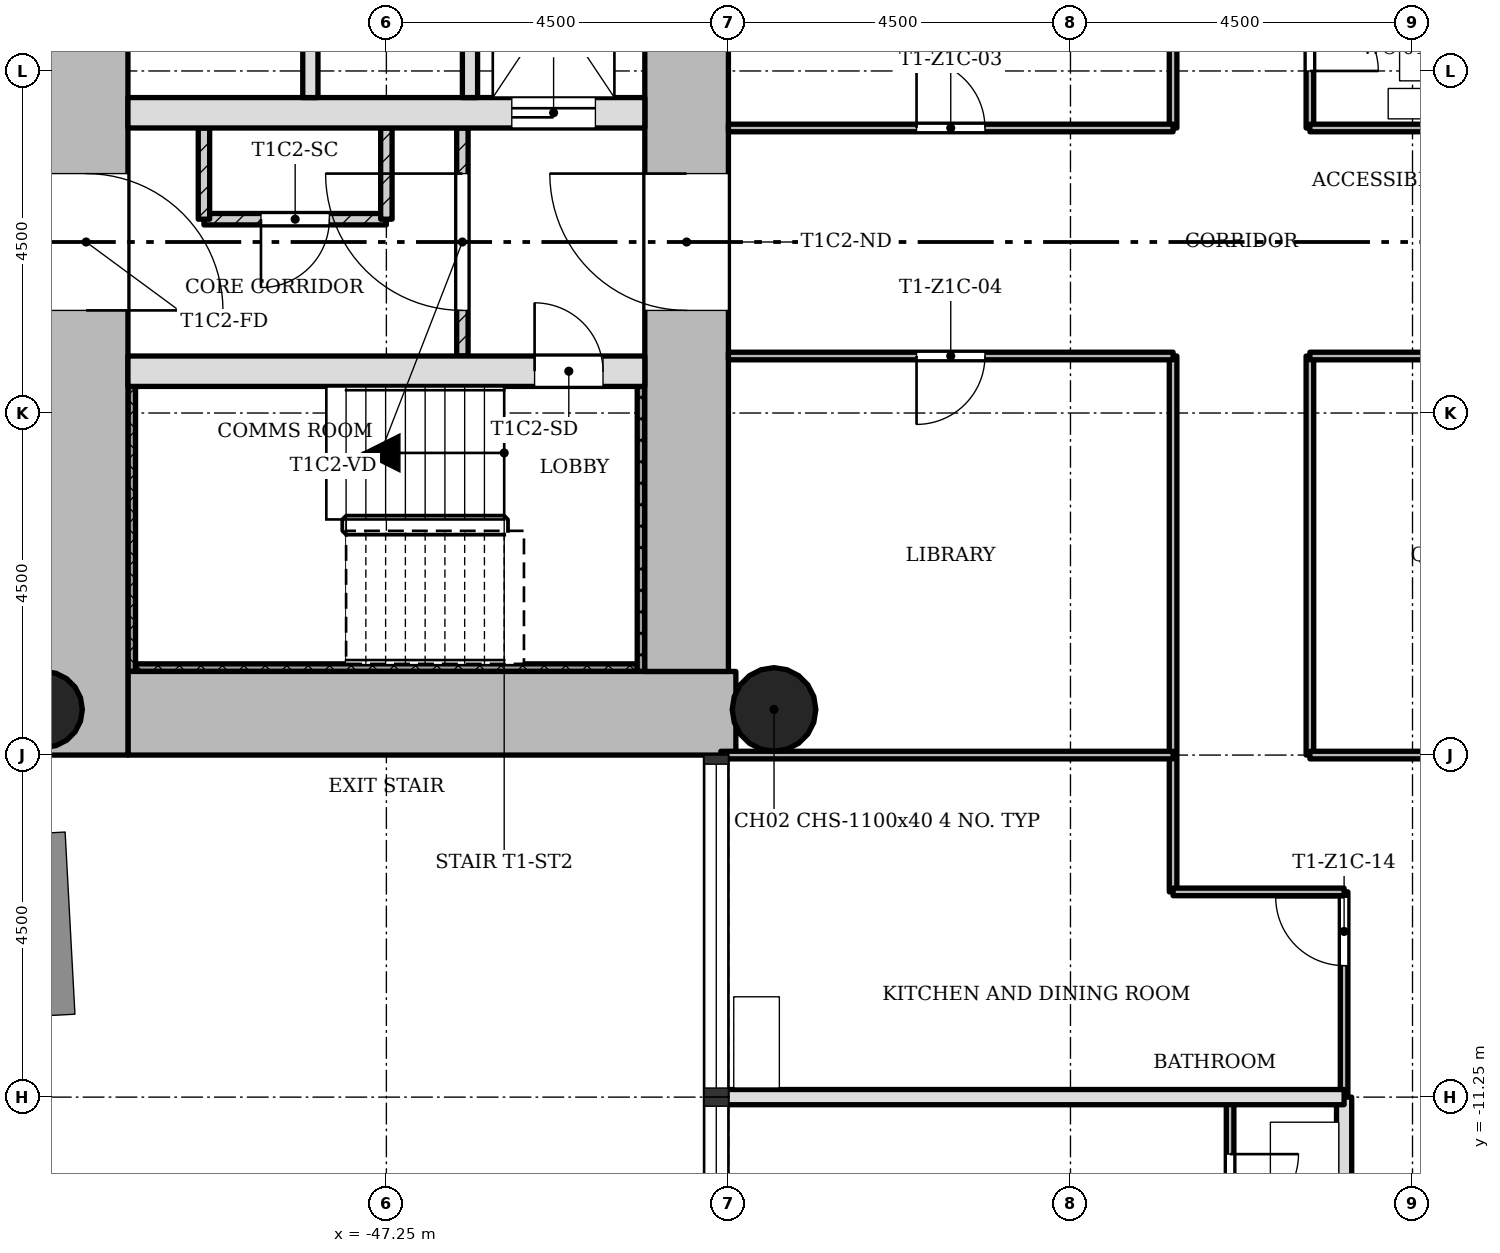
"""IFC4 building model, lengths in metres.
Left out: names, types, materials, properties, quantities, classifications, styles, units other than length and angle.
Written with IfcOpenShell. Run it as: python <this file> out.ifc"""

import sys

from ifc_helpers import new_model, si_unit, direction, frame, frame_2d, origin, origin_2d, place, context, subcontext, project, spatial, rectangle, hollow_circle, extrude, element, fill, save


model = new_model("IFC4")
c1 = context("Model", 3, precision=1e-05, world=origin(), true_north=direction((0.0, 1.0)))
c2 = subcontext(c1, "Body", "Model", "MODEL_VIEW")
j1 = project(units=[si_unit("LENGTHUNIT", "METRE"), si_unit("PLANEANGLEUNIT", "RADIAN")], contexts=[c1])
p1 = place(None, origin())
s1 = spatial("IfcSite", under=j1, at=p1, CompositionType="ELEMENT")
p2 = place(p1, origin())
s2 = spatial("IfcBuilding", under=s1, at=p2, CompositionType="ELEMENT")
p3 = place(p2, frame((0.0, 0.0, 44.9)))
s3 = spatial("IfcBuildingStorey", under=s2, at=p3, CompositionType="ELEMENT", Elevation=44.9)
p4 = place(p3, frame((-50.65, -6.2, 0.0), z_axis=(0.0, 0.0, 1.0), x_axis=(1.0, 0.0, 0.0)))
e1 = element("IfcWall", 1, at=p4, inside=s3, PredefinedType="SHEAR", context=c2, shape_type="SweptSolid", body=[
    extrude(rectangle(XDim=7.998, YDim=1.1, at=frame_2d((3.999, 0.0))), origin(), (0.0, 0.0, 1.0), 3.4),
])
p5 = place(p3, frame((-43.3, -5.65, 0.0), z_axis=(0.0, 0.0, 1.0), x_axis=(0.0, 1.0, 0.0)))
e2 = element("IfcWall", 2, at=p5, inside=s3, PredefinedType="SHEAR", context=c2, shape_type="SweptSolid", body=[
    extrude(rectangle(XDim=12.4, YDim=1.1, at=frame_2d((6.2, 0.0))), origin(), (0.0, 0.0, 1.0), 3.4),
])
p6 = place(p5, frame((4.75, 0.0, 0.0)))
e3 = element("IfcOpeningElement", 3, at=p6, cuts=e2, PredefinedType="OPENING", context=c2, shape_type="SweptSolid", body=[
    extrude(rectangle(XDim=1.8, YDim=2.1, at=frame_2d((0.9, 1.05))), frame((0.0, 0.56, 0.0), z_axis=(0.0, -1.0, 0.0), x_axis=(1.0, 0.0, 0.0)), (0.0, 0.0, 1.0), 1.12),
])
p7 = place(p3, frame((-51.2, 5.65, 0.0), z_axis=(0.0, 0.0, 1.0), x_axis=(0.0, -1.0, 0.0)))
e4 = element("IfcWall", 4, at=p7, inside=s3, PredefinedType="SHEAR", context=c2, shape_type="SweptSolid", body=[
    extrude(rectangle(XDim=12.4, YDim=1.1, at=frame_2d((6.2, 0.0))), origin(), (0.0, 0.0, 1.0), 3.4),
])
p8 = place(p7, frame((4.75, 0.0, 0.0)))
e5 = element("IfcOpeningElement", 5, at=p8, cuts=e4, PredefinedType="OPENING", context=c2, shape_type="SweptSolid", body=[
    extrude(rectangle(XDim=1.8, YDim=2.1, at=frame_2d((0.9, 1.05))), frame((0.0, 0.56, 0.0), z_axis=(0.0, -1.0, 0.0), x_axis=(1.0, 0.0, 0.0)), (0.0, 0.0, 1.0), 1.12),
])
p9 = place(p3, frame((-50.65, -1.7, 0.0), z_axis=(0.0, 0.0, 1.0), x_axis=(1.0, 0.0, 0.0)))
e6 = element("IfcWall", 6, at=p9, inside=s3, PredefinedType="SHEAR", context=c2, shape_type="SweptSolid", body=[
    extrude(rectangle(XDim=6.8, YDim=0.4, at=frame_2d((3.4, 0.0))), origin(), (0.0, 0.0, 1.0), 3.4),
])
p10 = place(p9, frame((5.35, 0.0, 0.0)))
e7 = element("IfcOpeningElement", 7, at=p10, cuts=e6, PredefinedType="OPENING", context=c2, shape_type="SweptSolid", body=[
    extrude(rectangle(XDim=0.9, YDim=2.1, at=frame_2d((0.45, 1.05))), frame((0.0, 0.21, 0.0), z_axis=(0.0, -1.0, 0.0), x_axis=(1.0, 0.0, 0.0)), (0.0, 0.0, 1.0), 0.42),
])
p11 = place(p3, frame((-50.65, 1.7, 0.0), z_axis=(0.0, 0.0, 1.0), x_axis=(1.0, 0.0, 0.0)))
e8 = element("IfcWall", 8, at=p11, inside=s3, PredefinedType="SHEAR", context=c2, shape_type="SweptSolid", body=[
    extrude(rectangle(XDim=6.8, YDim=0.4, at=frame_2d((3.4, 0.0))), origin(), (0.0, 0.0, 1.0), 3.4),
])
p12 = place(p11, frame((5.05, 0.0, 0.0)))
e9 = element("IfcOpeningElement", 9, at=p12, cuts=e8, PredefinedType="OPENING", context=c2, shape_type="SweptSolid", body=[
    extrude(rectangle(XDim=1.1, YDim=2.1, at=frame_2d((0.55, 1.05))), frame((0.0, 0.21, 0.0), z_axis=(0.0, -1.0, 0.0), x_axis=(1.0, 0.0, 0.0)), (0.0, 0.0, 1.0), 0.42),
])
p13 = place(p3, frame((-51.75, -6.15, 0.0), z_axis=(0.0, 0.0, 1.0), x_axis=(1.0, 0.0, 0.0)))
e10 = element("IfcColumn", 10, at=p13, inside=s3, PredefinedType="COLUMN", context=c2, shape_type="SweptSolid", body=[
    extrude(hollow_circle(Radius=0.5, WallThickness=0.036, at=origin_2d()), origin(), (0.0, 0.0, 1.0), 3.4),
])
p14 = place(p3, frame((-42.15, -6.15, 0.0), z_axis=(0.0, 0.0, 1.0), x_axis=(1.0, 0.0, 0.0)))
e11 = element("IfcColumn", 11, at=p14, inside=s3, PredefinedType="COLUMN", context=c2, shape_type="SweptSolid", body=[
    extrude(hollow_circle(Radius=0.55, WallThickness=0.04, at=origin_2d()), origin(), (0.0, 0.0, 1.0), 3.4),
])
p15 = place(p3, frame((-46.25, 1.5, 0.0), z_axis=(0.0, 0.0, 1.0), x_axis=(0.0, -1.0, 0.0)))
e12 = element("IfcWall", 12, at=p15, inside=s3, PredefinedType="PARTITIONING", context=c2, shape_type="SweptSolid", body=[
    extrude(rectangle(XDim=3.0, YDim=0.15, at=frame_2d((1.5, 0.0))), origin(), (0.0, 0.0, 1.0), 3.0),
])
p16 = place(p15, frame((0.6, 0.0, 0.0)))
e13 = element("IfcOpeningElement", 13, at=p16, cuts=e12, PredefinedType="OPENING", context=c2, shape_type="SweptSolid", body=[
    extrude(rectangle(XDim=1.8, YDim=2.1, at=frame_2d((0.9, 1.05))), frame((0.0, 0.085, 0.0), z_axis=(0.0, -1.0, 0.0), x_axis=(1.0, 0.0, 0.0)), (0.0, 0.0, 1.0), 0.17),
])
for number, where, z_axis, x_axis in (
    (14, (-46.15, 5.65, 0.0), (0.0, 0.0, 1.0), (0.0, -1.0, 0.0)),
    (15, (-48.25, 5.65, 0.0), (0.0, 0.0, 1.0), (0.0, -1.0, 0.0)),
):
    element("IfcWall", number, at=place(p3, frame(where, z_axis=z_axis, x_axis=x_axis)), inside=s3, PredefinedType="SOLIDWALL", context=c2, shape_type="SweptSolid", body=[
        extrude(rectangle(XDim=3.75, YDim=0.2, at=frame_2d((1.875, 0.0))), origin(), (0.0, 0.0, 1.0), 3.0),
    ])
p17 = place(p3, frame((-47.25, 0.3, 0.0), z_axis=(0.0, 0.0, 1.0), x_axis=(-1.0, 0.0, 0.0)))
e16 = element("IfcWall", 16, at=p17, inside=s3, PredefinedType="PARTITIONING", context=c2, shape_type="SweptSolid", body=[
    extrude(rectangle(XDim=2.4, YDim=0.15, at=frame_2d((1.2, 0.0))), origin(), (0.0, 0.0, 1.0), 3.0),
])
p18 = place(p17, frame((0.75, 0.0, 0.0)))
e17 = element("IfcOpeningElement", 17, at=p18, cuts=e16, PredefinedType="OPENING", context=c2, shape_type="SweptSolid", body=[
    extrude(rectangle(XDim=0.9, YDim=2.1, at=frame_2d((0.45, 1.05))), frame((0.0, 0.085, 0.0), z_axis=(0.0, -1.0, 0.0), x_axis=(1.0, 0.0, 0.0)), (0.0, 0.0, 1.0), 0.17),
])
for number, where, z_axis, x_axis in (
    (18, (-47.25, 0.3, 0.0), (0.0, 0.0, 1.0), (0.0, 1.0, 0.0)),
    (19, (-49.65, 0.3, 0.0), (0.0, 0.0, 1.0), (0.0, 1.0, 0.0)),
):
    element("IfcWall", number, at=place(p3, frame(where, z_axis=z_axis, x_axis=x_axis)), inside=s3, PredefinedType="PARTITIONING", context=c2, shape_type="SweptSolid", body=[
        extrude(rectangle(XDim=1.2, YDim=0.15, at=frame_2d((0.6, 0.0))), origin(), (0.0, 0.0, 1.0), 3.0),
    ])
p19 = place(p3, frame((-36.9, -8.55, 0.0), z_axis=(0.0, 0.0, 1.0), x_axis=(0.0, 1.0, 0.0)))
e20 = element("IfcWall", 20, at=p19, inside=s3, PredefinedType="PARTITIONING", context=c2, shape_type="SweptSolid", body=[
    extrude(rectangle(XDim=7.05, YDim=0.1, at=frame_2d((3.525, 0.0))), origin(), (0.0, 0.0, 1.0), 3.0),
])
p20 = place(p3, frame((-36.9, 1.5, 0.0), z_axis=(0.0, 0.0, 1.0), x_axis=(0.0, 1.0, 0.0)))
e21 = element("IfcWall", 21, at=p20, inside=s3, PredefinedType="PARTITIONING", context=c2, shape_type="SweptSolid", body=[
    extrude(rectangle(XDim=5.25, YDim=0.1, at=frame_2d((2.625, 0.0))), origin(), (0.0, 0.0, 1.0), 3.0),
])
p21 = place(p3, frame((-36.15, -13.65, 0.0), z_axis=(0.0, 0.0, 1.0), x_axis=(0.0, 1.0, 0.0)))
e22 = element("IfcWall", 22, at=p21, inside=s3, PredefinedType="PARTITIONING", context=c2, shape_type="SweptSolid", body=[
    extrude(rectangle(XDim=2.4, YDim=0.1, at=frame_2d((1.2, 0.0))), origin(), (0.0, 0.0, 1.0), 3.0),
])
p22 = place(p21, frame((0.75, 0.0, 0.0)))
e23 = element("IfcOpeningElement", 23, at=p22, cuts=e22, PredefinedType="OPENING", context=c2, shape_type="SweptSolid", body=[
    extrude(rectangle(XDim=0.9, YDim=2.1, at=frame_2d((0.45, 1.05))), frame((0.0, 0.06, 0.0), z_axis=(0.0, -1.0, 0.0), x_axis=(1.0, 0.0, 0.0)), (0.0, 0.0, 1.0), 0.12),
])
p23 = place(p3, frame((-35.1, -6.75, 0.0), z_axis=(0.0, 0.0, 1.0), x_axis=(0.0, 1.0, 0.0)))
e24 = element("IfcWall", 24, at=p23, inside=s3, PredefinedType="PARTITIONING", context=c2, shape_type="SweptSolid", body=[
    extrude(rectangle(XDim=5.25, YDim=0.1, at=frame_2d((2.625, 0.0))), origin(), (0.0, 0.0, 1.0), 3.0),
])
p24 = place(p3, frame((-35.1, 1.5, 0.0), z_axis=(0.0, 0.0, 1.0), x_axis=(0.0, 1.0, 0.0)))
e25 = element("IfcWall", 25, at=p24, inside=s3, PredefinedType="PARTITIONING", context=c2, shape_type="SweptSolid", body=[
    extrude(rectangle(XDim=7.05, YDim=0.1, at=frame_2d((3.525, 0.0))), origin(), (0.0, 0.0, 1.0), 3.0),
])
p25 = place(p24, frame((0.75, 0.0, 0.0)))
e26 = element("IfcOpeningElement", 26, at=p25, cuts=e25, PredefinedType="OPENING", context=c2, shape_type="SweptSolid", body=[
    extrude(rectangle(XDim=0.9, YDim=2.1, at=frame_2d((0.45, 1.05))), frame((0.0, 0.06, 0.0), z_axis=(0.0, -1.0, 0.0), x_axis=(1.0, 0.0, 0.0)), (0.0, 0.0, 1.0), 0.12),
])
p26 = place(p3, frame((-34.65, -11.25, 0.0), z_axis=(0.0, 0.0, 1.0), x_axis=(0.0, 1.0, 0.0)))
e27 = element("IfcWall", 27, at=p26, inside=s3, PredefinedType="PARTITIONING", context=c2, shape_type="SweptSolid", body=[
    extrude(rectangle(XDim=2.7, YDim=0.1, at=frame_2d((1.35, 0.0))), origin(), (0.0, 0.0, 1.0), 3.0),
])
p27 = place(p26, frame((1.73, 0.0, 0.0)))
e28 = element("IfcOpeningElement", 28, at=p27, cuts=e27, PredefinedType="OPENING", context=c2, shape_type="SweptSolid", body=[
    extrude(rectangle(XDim=0.9, YDim=2.1, at=frame_2d((0.45, 1.05))), frame((0.0, 0.06, 0.0), z_axis=(0.0, -1.0, 0.0), x_axis=(1.0, 0.0, 0.0)), (0.0, 0.0, 1.0), 0.12),
])
p28 = place(p3, frame((-34.65, -15.75, 0.0), z_axis=(0.0, 0.0, 1.0), x_axis=(0.0, 1.0, 0.0)))
e29 = element("IfcWall", 29, at=p28, inside=s3, PredefinedType="SOLIDWALL", context=c2, shape_type="SweptSolid", body=[
    extrude(rectangle(XDim=4.5, YDim=0.2, at=frame_2d((2.25, 0.0))), origin(), (0.0, 0.0, 1.0), 3.0),
])
p29 = place(p28, frame((0.6, 0.0, 0.0)))
e30 = element("IfcOpeningElement", 30, at=p29, cuts=e29, PredefinedType="OPENING", context=c2, shape_type="SweptSolid", body=[
    extrude(rectangle(XDim=0.9, YDim=2.1, at=frame_2d((0.45, 1.05))), frame((0.0, 0.11, 0.0), z_axis=(0.0, -1.0, 0.0), x_axis=(1.0, 0.0, 0.0)), (0.0, 0.0, 1.0), 0.22),
])
p30 = place(p3, frame((-42.85, -11.25, 0.0), z_axis=(0.0, 0.0, 1.0), x_axis=(1.0, 0.0, 0.0)))
e31 = element("IfcWall", 31, at=p30, inside=s3, PredefinedType="SOLIDWALL", context=c2, shape_type="SweptSolid", body=[
    extrude(rectangle(XDim=8.2, YDim=0.2, at=frame_2d((4.1, 0.0))), origin(), (0.0, 0.0, 1.0), 3.0),
])
p31 = place(p3, frame((-36.9, -8.55, 0.0), z_axis=(0.0, 0.0, 1.0), x_axis=(1.0, 0.0, 0.0)))
e32 = element("IfcWall", 32, at=p31, inside=s3, PredefinedType="PARTITIONING", context=c2, shape_type="SweptSolid", body=[
    extrude(rectangle(XDim=2.25, YDim=0.1, at=frame_2d((1.125, 0.0))), origin(), (0.0, 0.0, 1.0), 3.0),
])
for number, where, z_axis, x_axis in (
    (33, (-42.85, -6.75, 0.0), (0.0, 0.0, 1.0), (1.0, 0.0, 0.0)),
    (34, (-35.1, -6.75, 0.0), (0.0, 0.0, 1.0), (1.0, 0.0, 0.0)),
):
    element("IfcWall", number, at=place(p3, frame(where, z_axis=z_axis, x_axis=x_axis)), inside=s3, PredefinedType="PARTITIONING", context=c2, shape_type="SweptSolid", body=[
        extrude(rectangle(XDim=5.95, YDim=0.1, at=frame_2d((2.975, 0.0))), origin(), (0.0, 0.0, 1.0), 3.0),
    ])
p32 = place(p3, frame((-42.75, -1.5, 0.0), z_axis=(0.0, 0.0, 1.0), x_axis=(1.0, 0.0, 0.0)))
e35 = element("IfcWall", 35, at=p32, inside=s3, PredefinedType="PARTITIONING", context=c2, shape_type="SweptSolid", body=[
    extrude(rectangle(XDim=5.85, YDim=0.1, at=frame_2d((2.925, 0.0))), origin(), (0.0, 0.0, 1.0), 3.0),
])
p33 = place(p32, frame((2.475, 0.0, 0.0)))
e36 = element("IfcOpeningElement", 36, at=p33, cuts=e35, PredefinedType="OPENING", context=c2, shape_type="SweptSolid", body=[
    extrude(rectangle(XDim=0.9, YDim=2.1, at=frame_2d((0.45, 1.05))), frame((0.0, 0.06, 0.0), z_axis=(0.0, -1.0, 0.0), x_axis=(1.0, 0.0, 0.0)), (0.0, 0.0, 1.0), 0.12),
])
p34 = place(p3, frame((-35.1, -1.5, 0.0), z_axis=(0.0, 0.0, 1.0), x_axis=(1.0, 0.0, 0.0)))
e37 = element("IfcWall", 37, at=p34, inside=s3, PredefinedType="PARTITIONING", context=c2, shape_type="SweptSolid", body=[
    extrude(rectangle(XDim=5.85, YDim=0.1, at=frame_2d((2.925, 0.0))), origin(), (0.0, 0.0, 1.0), 3.0),
])
p35 = place(p34, frame((2.475, 0.0, 0.0)))
e38 = element("IfcOpeningElement", 38, at=p35, cuts=e37, PredefinedType="OPENING", context=c2, shape_type="SweptSolid", body=[
    extrude(rectangle(XDim=0.9, YDim=2.1, at=frame_2d((0.45, 1.05))), frame((0.0, 0.06, 0.0), z_axis=(0.0, -1.0, 0.0), x_axis=(1.0, 0.0, 0.0)), (0.0, 0.0, 1.0), 0.12),
])
p36 = place(p3, frame((-42.75, 1.5, 0.0), z_axis=(0.0, 0.0, 1.0), x_axis=(1.0, 0.0, 0.0)))
e39 = element("IfcWall", 39, at=p36, inside=s3, PredefinedType="PARTITIONING", context=c2, shape_type="SweptSolid", body=[
    extrude(rectangle(XDim=5.85, YDim=0.1, at=frame_2d((2.925, 0.0))), origin(), (0.0, 0.0, 1.0), 3.0),
])
p37 = place(p36, frame((2.475, 0.0, 0.0)))
e40 = element("IfcOpeningElement", 40, at=p37, cuts=e39, PredefinedType="OPENING", context=c2, shape_type="SweptSolid", body=[
    extrude(rectangle(XDim=0.9, YDim=2.1, at=frame_2d((0.45, 1.05))), frame((0.0, 0.06, 0.0), z_axis=(0.0, -1.0, 0.0), x_axis=(1.0, 0.0, 0.0)), (0.0, 0.0, 1.0), 0.12),
])
p38 = place(p3, frame((-35.1, 1.5, 0.0), z_axis=(0.0, 0.0, 1.0), x_axis=(1.0, 0.0, 0.0)))
e41 = element("IfcWall", 41, at=p38, inside=s3, PredefinedType="PARTITIONING", context=c2, shape_type="SweptSolid", body=[
    extrude(rectangle(XDim=5.85, YDim=0.1, at=frame_2d((2.925, 0.0))), origin(), (0.0, 0.0, 1.0), 3.0),
])
p39 = place(p38, frame((3.375, 0.0, 0.0)))
e42 = element("IfcOpeningElement", 42, at=p39, cuts=e41, PredefinedType="OPENING", context=c2, shape_type="SweptSolid", body=[
    extrude(rectangle(XDim=0.9, YDim=2.1, at=frame_2d((0.45, 1.05))), frame((0.0, 0.06, 0.0), z_axis=(0.0, -1.0, 0.0), x_axis=(1.0, 0.0, 0.0)), (0.0, 0.0, 1.0), 0.12),
])
p40 = place(p3, frame((-50.6, -1.9, 0.0), z_axis=(0.0, 0.0, 1.0), x_axis=(0.0, -1.0, 0.0)))
e43 = element("IfcWall", 43, at=p40, inside=s3, PredefinedType="SHEAR", context=c2, shape_type="SweptSolid", body=[
    extrude(rectangle(XDim=3.75, YDim=0.1, at=frame_2d((1.875, 0.0))), origin(), (0.0, 0.0, 1.0), 3.4),
])
p41 = place(p3, frame((-43.95, -5.6, 0.0), z_axis=(0.0, 0.0, 1.0), x_axis=(-1.0, 0.0, 0.0)))
e44 = element("IfcWall", 44, at=p41, inside=s3, PredefinedType="SHEAR", context=c2, shape_type="SweptSolid", body=[
    extrude(rectangle(XDim=6.6, YDim=0.1, at=frame_2d((3.3, 0.0))), origin(), (0.0, 0.0, 1.0), 3.4),
])
p42 = place(p3, frame((-43.9, -1.9, 0.0), z_axis=(0.0, 0.0, 1.0), x_axis=(0.0, -1.0, 0.0)))
e45 = element("IfcWall", 45, at=p42, inside=s3, PredefinedType="SHEAR", context=c2, shape_type="SweptSolid", body=[
    extrude(rectangle(XDim=3.75, YDim=0.1, at=frame_2d((1.875, 0.0))), origin(), (0.0, 0.0, 1.0), 3.4),
])
p43 = place(p16, origin())
e46 = element("IfcDoor", 46, at=p43, inside=s3, OperationType="SINGLE_SWING_LEFT", PredefinedType="DOOR", context=c2, shape_type="SweptSolid", body=[
    extrude(rectangle(XDim=1.8, YDim=2.1, at=frame_2d((0.9, 1.05))), frame((0.0, 0.025, 0.0), z_axis=(0.0, -1.0, 0.0), x_axis=(1.0, 0.0, 0.0)), (0.0, 0.0, 1.0), 0.05),
])
fill(e13, e46)
p44 = place(p18, origin())
e47 = element("IfcDoor", 47, at=p44, inside=s3, OperationType="SINGLE_SWING_LEFT", PredefinedType="DOOR", context=c2, shape_type="SweptSolid", body=[
    extrude(rectangle(XDim=0.9, YDim=2.1, at=frame_2d((0.45, 1.05))), frame((0.0, 0.025, 0.0), z_axis=(0.0, -1.0, 0.0), x_axis=(1.0, 0.0, 0.0)), (0.0, 0.0, 1.0), 0.05),
])
fill(e17, e47)
p45 = place(p25, origin())
e48 = element("IfcDoor", 48, at=p45, inside=s3, OperationType="SINGLE_SWING_LEFT", PredefinedType="DOOR", context=c2, shape_type="SweptSolid", body=[
    extrude(rectangle(XDim=0.9, YDim=2.1, at=frame_2d((0.45, 1.05))), frame((0.0, 0.025, 0.0), z_axis=(0.0, -1.0, 0.0), x_axis=(1.0, 0.0, 0.0)), (0.0, 0.0, 1.0), 0.05),
])
fill(e26, e48)
p46 = place(p37, origin())
e49 = element("IfcDoor", 49, at=p46, inside=s3, OperationType="SINGLE_SWING_RIGHT", PredefinedType="DOOR", context=c2, shape_type="SweptSolid", body=[
    extrude(rectangle(XDim=0.9, YDim=2.1, at=frame_2d((0.45, 1.05))), frame((0.0, 0.025, 0.0), z_axis=(0.0, -1.0, 0.0), x_axis=(1.0, 0.0, 0.0)), (0.0, 0.0, 1.0), 0.05),
])
fill(e40, e49)
p47 = place(p33, origin())
e50 = element("IfcDoor", 50, at=p47, inside=s3, OperationType="SINGLE_SWING_LEFT", PredefinedType="DOOR", context=c2, shape_type="SweptSolid", body=[
    extrude(rectangle(XDim=0.9, YDim=2.1, at=frame_2d((0.45, 1.05))), frame((0.0, 0.025, 0.0), z_axis=(0.0, -1.0, 0.0), x_axis=(1.0, 0.0, 0.0)), (0.0, 0.0, 1.0), 0.05),
])
fill(e36, e50)
p48 = place(p27, origin())
e51 = element("IfcDoor", 51, at=p48, inside=s3, OperationType="SINGLE_SWING_LEFT", PredefinedType="DOOR", context=c2, shape_type="SweptSolid", body=[
    extrude(rectangle(XDim=0.9, YDim=2.1, at=frame_2d((0.45, 1.05))), frame((0.0, 0.025, 0.0), z_axis=(0.0, -1.0, 0.0), x_axis=(1.0, 0.0, 0.0)), (0.0, 0.0, 1.0), 0.05),
])
fill(e28, e51)
p49 = place(p22, origin())
e52 = element("IfcDoor", 52, at=p49, inside=s3, OperationType="SINGLE_SWING_RIGHT", PredefinedType="DOOR", context=c2, shape_type="SweptSolid", body=[
    extrude(rectangle(XDim=0.9, YDim=2.1, at=frame_2d((0.45, 1.05))), frame((0.0, 0.025, 0.0), z_axis=(0.0, -1.0, 0.0), x_axis=(1.0, 0.0, 0.0)), (0.0, 0.0, 1.0), 0.05),
])
fill(e23, e52)
p50 = place(p10, origin())
e53 = element("IfcDoor", 53, at=p50, inside=s3, OperationType="SINGLE_SWING_RIGHT", PredefinedType="DOOR", context=c2, shape_type="SweptSolid", body=[
    extrude(rectangle(XDim=0.9, YDim=2.1, at=frame_2d((0.45, 1.05))), frame((0.0, 0.025, 0.0), z_axis=(0.0, -1.0, 0.0), x_axis=(1.0, 0.0, 0.0)), (0.0, 0.0, 1.0), 0.05),
])
fill(e7, e53)
p51 = place(p12, origin())
e54 = element("IfcDoor", 54, at=p51, inside=s3, OperationType="SLIDING_TO_LEFT", PredefinedType="DOOR", context=c2, shape_type="SweptSolid", body=[
    extrude(rectangle(XDim=1.1, YDim=2.1, at=frame_2d((0.55, 1.05))), frame((0.0, 0.025, 0.0), z_axis=(0.0, -1.0, 0.0), x_axis=(1.0, 0.0, 0.0)), (0.0, 0.0, 1.0), 0.05),
])
fill(e9, e54)
p52 = place(p6, origin())
e55 = element("IfcDoor", 55, at=p52, inside=s3, OperationType="SINGLE_SWING_LEFT", PredefinedType="DOOR", context=c2, shape_type="SweptSolid", body=[
    extrude(rectangle(XDim=1.8, YDim=2.1, at=frame_2d((0.9, 1.05))), frame((0.0, 0.025, 0.0), z_axis=(0.0, -1.0, 0.0), x_axis=(1.0, 0.0, 0.0)), (0.0, 0.0, 1.0), 0.05),
])
fill(e3, e55)
p53 = place(p8, origin())
e56 = element("IfcDoor", 56, at=p53, inside=s3, OperationType="SINGLE_SWING_LEFT", PredefinedType="DOOR", context=c2, shape_type="SweptSolid", body=[
    extrude(rectangle(XDim=1.8, YDim=2.1, at=frame_2d((0.9, 1.05))), frame((0.0, 0.025, 0.0), z_axis=(0.0, -1.0, 0.0), x_axis=(1.0, 0.0, 0.0)), (0.0, 0.0, 1.0), 0.05),
])
fill(e5, e56)
save(model, sys.argv[1])
